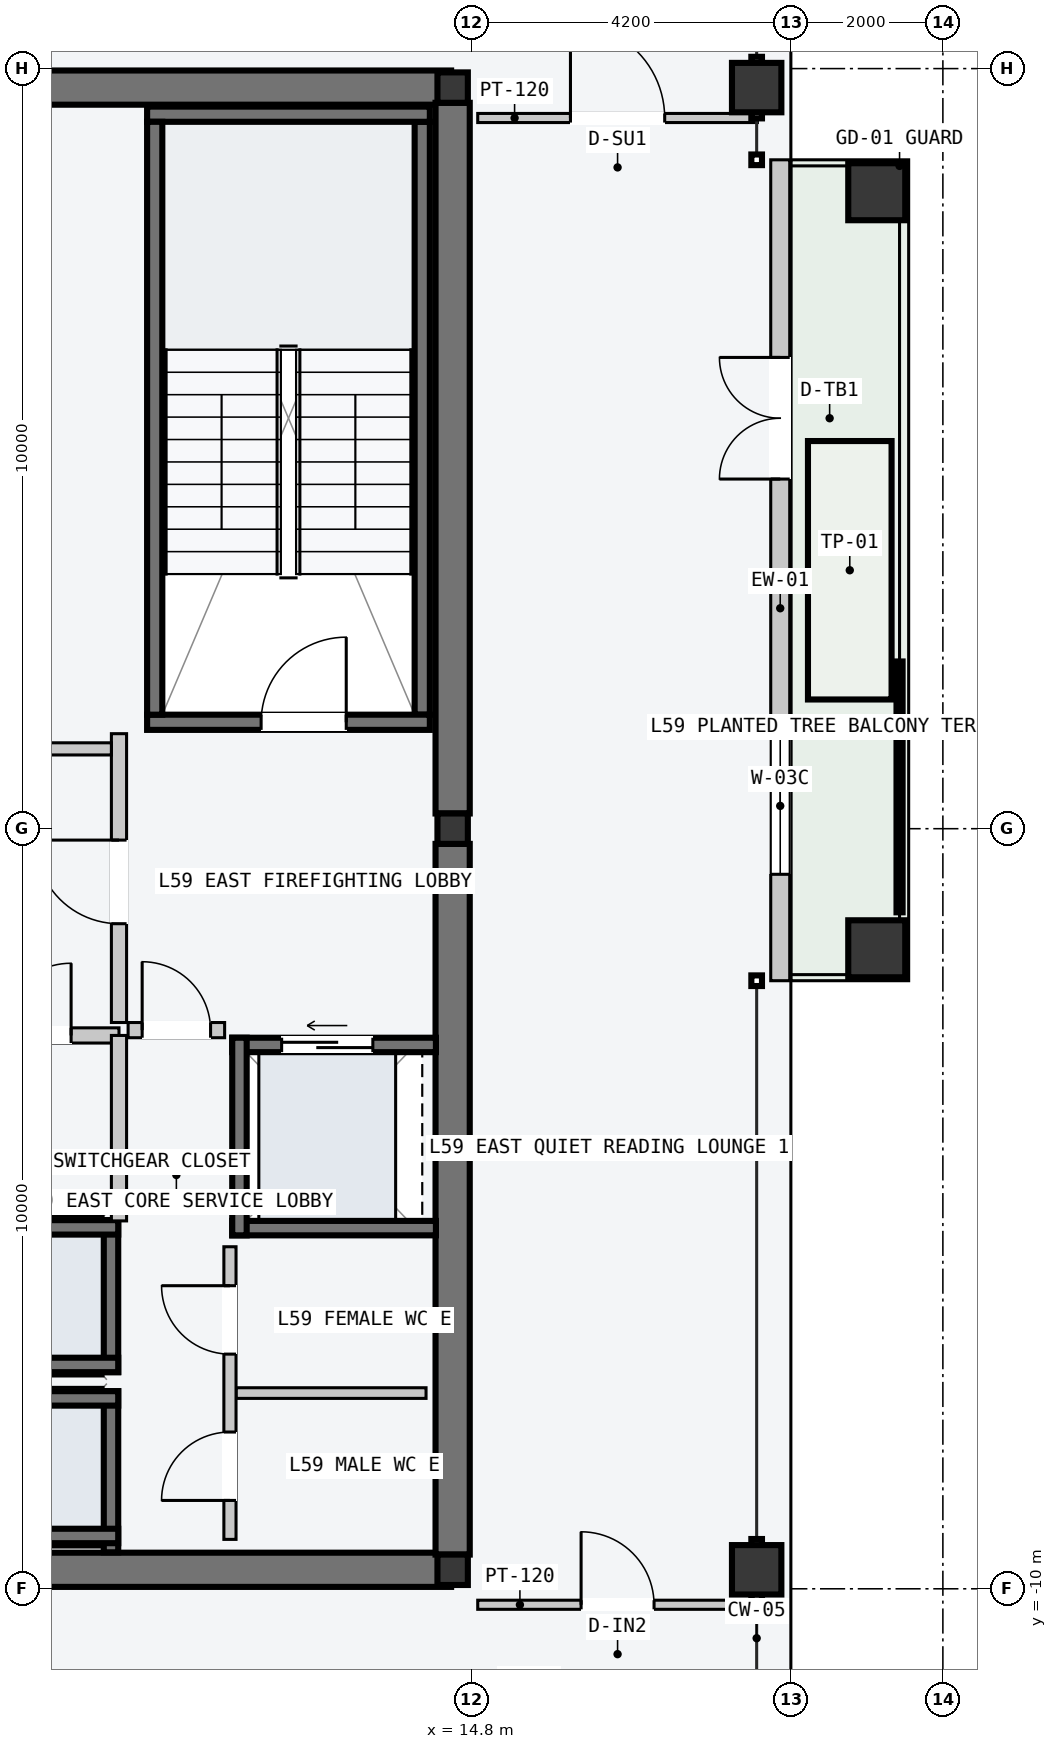
"""IFC4 building model, lengths in metres.
Left out: names, types, materials, properties, quantities, classifications, styles, units other than length and angle.
Written with IfcOpenShell. Run it as: python <this file> out.ifc"""

import sys

from ifc_helpers import new_model, si_unit, direction, frame, frame_2d, origin, origin_2d, place, context, subcontext, project, spatial, rectangle, hollow_rectangle, i_section, extrude, element, fill, save


model = new_model("IFC4")
c1 = context("Model", 3, precision=1e-05, world=origin(), true_north=direction((0.0, 1.0)))
c2 = subcontext(c1, "Body", "Model", "MODEL_VIEW")
j1 = project(units=[si_unit("LENGTHUNIT", "METRE"), si_unit("PLANEANGLEUNIT", "RADIAN")], contexts=[c1])
p1 = place(None, origin())
s1 = spatial("IfcSite", under=j1, at=p1, CompositionType="ELEMENT")
p2 = place(p1, origin())
s2 = spatial("IfcBuilding", under=s1, at=p2, CompositionType="ELEMENT")
p3 = place(p2, frame((0.0, 0.0, 225.6)))
s3 = spatial("IfcBuildingStorey", under=s2, at=p3, CompositionType="ELEMENT", Elevation=225.6)
for number, where, z_axis, x_axis in (
    (1, (8.07, -9.75, -0.2), (0.0, 0.0, 1.0), (1.0, 0.0, 0.0)),
    (2, (8.07, 9.75, -0.2), (0.0, 0.0, 1.0), (1.0, 0.0, 0.0)),
):
    element("IfcWall", number, at=place(p3, frame(where, z_axis=z_axis, x_axis=x_axis)), inside=s3, PredefinedType="SHEAR", context=c2, shape_type="SweptSolid", body=[
        extrude(rectangle(XDim=6.46, YDim=0.45, at=frame_2d((3.23, 0.0))), origin(), (0.0, 0.0, 1.0), 3.6),
    ])
for number, where, z_axis, x_axis in (
    (3, (14.55, -9.55, -0.2), (0.0, 0.0, 1.0), (0.0, 1.0, 0.0)),
    (4, (14.55, 0.2, -0.2), (0.0, 0.0, 1.0), (0.0, 1.0, 0.0)),
):
    element("IfcWall", number, at=place(p3, frame(where, z_axis=z_axis, x_axis=x_axis)), inside=s3, PredefinedType="SHEAR", context=c2, shape_type="SweptSolid", body=[
        extrude(rectangle(XDim=9.35, YDim=0.45, at=frame_2d((4.675, 0.0))), origin(), (0.0, 0.0, 1.0), 3.6),
    ])
p4 = place(p3, frame((14.15, 1.5, -0.2), z_axis=(0.0, 0.0, 1.0), x_axis=(0.0, 1.0, 0.0)))
e5 = element("IfcWall", 5, at=p4, inside=s3, PredefinedType="SOLIDWALL", context=c2, shape_type="SweptSolid", body=[
    extrude(rectangle(XDim=7.8, YDim=0.2, at=frame_2d((3.9, 0.0))), origin(), (0.0, 0.0, 1.0), 3.6),
])
p5 = place(p3, frame((10.53, 1.4, -0.2), z_axis=(0.0, 0.0, 1.0), x_axis=(1.0, 0.0, 0.0)))
e6 = element("IfcWall", 6, at=p5, inside=s3, PredefinedType="SOLIDWALL", context=c2, shape_type="SweptSolid", body=[
    extrude(rectangle(XDim=3.72, YDim=0.2, at=frame_2d((1.86, 0.0))), origin(), (0.0, 0.0, 1.0), 3.6),
])
p6 = place(p5, frame((1.5, 0.0, 0.2)))
e7 = element("IfcOpeningElement", 7, at=p6, cuts=e6, PredefinedType="OPENING", context=c2, shape_type="SweptSolid", body=[
    extrude(rectangle(XDim=1.12, YDim=2.18, at=frame_2d((0.56, 1.09))), frame((0.0, 0.11, 0.0), z_axis=(0.0, -1.0, 0.0), x_axis=(1.0, 0.0, 0.0)), (0.0, 0.0, 1.0), 0.22),
])
p7 = place(p3, frame((10.53, 9.4, -0.2), z_axis=(0.0, 0.0, 1.0), x_axis=(1.0, 0.0, 0.0)))
e8 = element("IfcWall", 8, at=p7, inside=s3, PredefinedType="SOLIDWALL", context=c2, shape_type="SweptSolid", body=[
    extrude(rectangle(XDim=3.72, YDim=0.2, at=frame_2d((1.86, 0.0))), origin(), (0.0, 0.0, 1.0), 3.6),
])
p8 = place(p3, frame((10.63, 1.5, -0.2), z_axis=(0.0, 0.0, 1.0), x_axis=(0.0, 1.0, 0.0)))
e9 = element("IfcWall", 9, at=p8, inside=s3, PredefinedType="SOLIDWALL", context=c2, shape_type="SweptSolid", body=[
    extrude(rectangle(XDim=7.8, YDim=0.2, at=frame_2d((3.9, 0.0))), origin(), (0.0, 0.0, 1.0), 3.6),
])
for number, where, z_axis, x_axis in (
    (10, (14.55, -9.75, 0.0), (0.0, 0.0, 1.0), (1.0, 0.0, 0.0)),
    (11, (14.55, 0.0, 0.0), (0.0, 0.0, 1.0), (1.0, 0.0, 0.0)),
    (12, (14.55, 9.75, 0.0), (0.0, 0.0, 1.0), (1.0, 0.0, 0.0)),
):
    element("IfcColumn", number, at=place(p3, frame(where, z_axis=z_axis, x_axis=x_axis)), inside=s3, PredefinedType="COLUMN", context=c2, shape_type="SweptSolid", body=[
        extrude(i_section(OverallWidth=0.4, OverallDepth=0.4, WebThickness=0.013, FlangeThickness=0.021, at=origin_2d()), origin(), (0.0, 0.0, 1.0), 3.6),
    ])
for number, where, z_axis, x_axis in (
    (13, (18.55, -9.75, 0.0), (0.0, 0.0, 1.0), (0.0, 1.0, 0.0)),
    (14, (18.55, 9.75, 0.0), (0.0, 0.0, 1.0), (0.0, 1.0, 0.0)),
):
    element("IfcColumn", number, at=place(p3, frame(where, z_axis=z_axis, x_axis=x_axis)), inside=s3, PredefinedType="COLUMN", context=c2, shape_type="SweptSolid", body=[
        extrude(hollow_rectangle(XDim=0.65, YDim=0.65, WallThickness=0.028, at=origin_2d()), origin(), (0.0, 0.0, 1.0), 3.6),
    ])
for number, where, z_axis, x_axis in (
    (15, (20.13, -1.58, 0.0), (0.0, 0.0, 1.0), (0.0, 1.0, 0.0)),
    (16, (20.13, 8.38, 0.0), (0.0, 0.0, 1.0), (0.0, 1.0, 0.0)),
):
    element("IfcColumn", number, at=place(p3, frame(where, z_axis=z_axis, x_axis=x_axis)), inside=s3, PredefinedType="COLUMN", context=c2, shape_type="SweptSolid", body=[
        extrude(hollow_rectangle(XDim=0.75, YDim=0.75, WallThickness=0.032, at=origin_2d()), origin(), (0.0, 0.0, 1.0), 3.6),
    ])
p9 = place(p3, frame((18.86, -2.0, 0.0), z_axis=(0.0, 0.0, 1.0), x_axis=(0.0, 1.0, 0.0)))
e17 = element("IfcWall", 17, at=p9, inside=s3, PredefinedType="STANDARD", context=c2, shape_type="SweptSolid", body=[
    extrude(rectangle(XDim=10.8, YDim=0.25, at=frame_2d((5.4, 0.0))), origin(), (0.0, 0.0, 1.0), 3.4),
])
p10 = place(p9, frame((6.6, 0.0, 0.0)))
e18 = element("IfcOpeningElement", 18, at=p10, cuts=e17, PredefinedType="OPENING", context=c2, shape_type="SweptSolid", body=[
    extrude(rectangle(XDim=1.6, YDim=2.2, at=frame_2d((0.8, 1.1))), frame((0.0, 0.135, 0.0), z_axis=(0.0, -1.0, 0.0), x_axis=(1.0, 0.0, 0.0)), (0.0, 0.0, 1.0), 0.27),
])
p11 = place(p9, frame((1.4, 0.0, 0.85)))
e19 = element("IfcOpeningElement", 19, at=p11, cuts=e17, PredefinedType="OPENING", context=c2, shape_type="SweptSolid", body=[
    extrude(rectangle(XDim=1.8, YDim=2.05, at=frame_2d((0.9, 1.025))), frame((0.0, 0.135, 0.0), z_axis=(0.0, -1.0, 0.0), x_axis=(1.0, 0.0, 0.0)), (0.0, 0.0, 1.0), 0.27),
])
p12 = place(p3, frame((10.055, -9.52, -0.2), z_axis=(0.0, 0.0, 1.0), x_axis=(0.0, 1.0, 0.0)))
e20 = element("IfcWall", 20, at=p12, inside=s3, PredefinedType="SOLIDWALL", context=c2, shape_type="SweptSolid", body=[
    extrude(rectangle(XDim=2.12, YDim=0.19, at=frame_2d((1.06, 0.0))), origin(), (0.0, 0.0, 1.0), 3.6),
])
for number, where, z_axis, x_axis in (
    (21, (7.95, -7.495, -0.2), (0.0, 0.0, 1.0), (1.0, 0.0, 0.0)),
    (22, (7.95, -9.305, -0.2), (0.0, 0.0, 1.0), (1.0, 0.0, 0.0)),
):
    element("IfcWall", number, at=place(p3, frame(where, z_axis=z_axis, x_axis=x_axis)), inside=s3, PredefinedType="SOLIDWALL", context=c2, shape_type="SweptSolid", body=[
        extrude(rectangle(XDim=2.2, YDim=0.19, at=frame_2d((1.1, 0.0))), origin(), (0.0, 0.0, 1.0), 3.6),
    ])
p13 = place(p3, frame((10.055, -7.15, -0.2), z_axis=(0.0, 0.0, 1.0), x_axis=(0.0, 1.0, 0.0)))
e23 = element("IfcWall", 23, at=p13, inside=s3, PredefinedType="SOLIDWALL", context=c2, shape_type="SweptSolid", body=[
    extrude(rectangle(XDim=2.0, YDim=0.19, at=frame_2d((1.0, 0.0))), origin(), (0.0, 0.0, 1.0), 3.6),
])
for number, where, z_axis, x_axis in (
    (24, (7.95, -5.245, -0.2), (0.0, 0.0, 1.0), (1.0, 0.0, 0.0)),
    (25, (7.95, -7.055, -0.2), (0.0, 0.0, 1.0), (1.0, 0.0, 0.0)),
):
    element("IfcWall", number, at=place(p3, frame(where, z_axis=z_axis, x_axis=x_axis)), inside=s3, PredefinedType="SOLIDWALL", context=c2, shape_type="SweptSolid", body=[
        extrude(rectangle(XDim=2.2, YDim=0.19, at=frame_2d((1.1, 0.0))), origin(), (0.0, 0.0, 1.0), 3.6),
    ])
p14 = place(p3, frame((11.65, -2.845, -0.2), z_axis=(0.0, 0.0, 1.0), x_axis=(1.0, 0.0, 0.0)))
e26 = element("IfcWall", 26, at=p14, inside=s3, PredefinedType="SOLIDWALL", context=c2, shape_type="SweptSolid", body=[
    extrude(rectangle(XDim=2.68, YDim=0.19, at=frame_2d((1.34, 0.0))), origin(), (0.0, 0.0, 1.0), 3.6),
])
p15 = place(p14, frame((0.65, 0.0, 0.2)))
e27 = element("IfcOpeningElement", 27, at=p15, cuts=e26, PredefinedType="OPENING", context=c2, shape_type="SweptSolid", body=[
    extrude(rectangle(XDim=1.2, YDim=2.2, at=frame_2d((0.6, 1.1))), frame((0.0, 0.105, 0.0), z_axis=(0.0, -1.0, 0.0), x_axis=(1.0, 0.0, 0.0)), (0.0, 0.0, 1.0), 0.21),
])
p16 = place(p3, frame((11.65, -5.255, -0.2), z_axis=(0.0, 0.0, 1.0), x_axis=(1.0, 0.0, 0.0)))
e28 = element("IfcWall", 28, at=p16, inside=s3, PredefinedType="SOLIDWALL", context=c2, shape_type="SweptSolid", body=[
    extrude(rectangle(XDim=2.68, YDim=0.19, at=frame_2d((1.34, 0.0))), origin(), (0.0, 0.0, 1.0), 3.6),
])
p17 = place(p3, frame((11.745, -5.35, -0.2), z_axis=(0.0, 0.0, 1.0), x_axis=(0.0, 1.0, 0.0)))
e29 = element("IfcWall", 29, at=p17, inside=s3, PredefinedType="SOLIDWALL", context=c2, shape_type="SweptSolid", body=[
    extrude(rectangle(XDim=2.6, YDim=0.19, at=frame_2d((1.3, 0.0))), origin(), (0.0, 0.0, 1.0), 3.6),
])
p18 = place(p3, frame((10.16, -2.55, 0.0), z_axis=(0.0, 0.0, 1.0), x_axis=(0.0, 1.0, 0.0)))
e30 = element("IfcWall", 30, at=p18, inside=s3, PredefinedType="PARTITIONING", context=c2, shape_type="SweptSolid", body=[
    extrude(rectangle(XDim=3.8, YDim=0.2, at=frame_2d((1.9, 0.0))), origin(), (0.0, 0.0, 1.0), 3.4),
])
p19 = place(p18, frame((1.3, 0.0, 0.0)))
e31 = element("IfcOpeningElement", 31, at=p19, cuts=e30, PredefinedType="OPENING", context=c2, shape_type="SweptSolid", body=[
    extrude(rectangle(XDim=1.1, YDim=2.15, at=frame_2d((0.55, 1.075))), frame((0.0, 0.11, 0.0), z_axis=(0.0, -1.0, 0.0), x_axis=(1.0, 0.0, 0.0)), (0.0, 0.0, 1.0), 0.22),
])
p20 = place(p3, frame((10.28, -2.65, 0.0), z_axis=(0.0, 0.0, 1.0), x_axis=(1.0, 0.0, 0.0)))
e32 = element("IfcWall", 32, at=p20, inside=s3, PredefinedType="PARTITIONING", context=c2, shape_type="SweptSolid", body=[
    extrude(rectangle(XDim=1.27, YDim=0.2, at=frame_2d((0.635, 0.0))), origin(), (0.0, 0.0, 1.0), 3.4),
])
p21 = place(p20, frame((0.185, 0.0, 0.0)))
e33 = element("IfcOpeningElement", 33, at=p21, cuts=e32, PredefinedType="OPENING", context=c2, shape_type="SweptSolid", body=[
    extrude(rectangle(XDim=0.9, YDim=2.15, at=frame_2d((0.45, 1.075))), frame((0.0, 0.11, 0.0), z_axis=(0.0, -1.0, 0.0), x_axis=(1.0, 0.0, 0.0)), (0.0, 0.0, 1.0), 0.22),
])
p22 = place(p3, frame((7.96, -2.72, 0.0), z_axis=(0.0, 0.0, 1.0), x_axis=(1.0, 0.0, 0.0)))
e34 = element("IfcWall", 34, at=p22, inside=s3, PredefinedType="PARTITIONING", context=c2, shape_type="SweptSolid", body=[
    extrude(rectangle(XDim=2.2, YDim=0.2, at=frame_2d((1.1, 0.0))), origin(), (0.0, 0.0, 1.0), 3.4),
])
p23 = place(p22, frame((0.62, 0.0, 0.0)))
e35 = element("IfcOpeningElement", 35, at=p23, cuts=e34, PredefinedType="OPENING", context=c2, shape_type="SweptSolid", body=[
    extrude(rectangle(XDim=0.95, YDim=2.1, at=frame_2d((0.475, 1.05))), frame((0.0, 0.11, 0.0), z_axis=(0.0, -1.0, 0.0), x_axis=(1.0, 0.0, 0.0)), (0.0, 0.0, 1.0), 0.22),
])
p24 = place(p3, frame((10.16, -5.16, 0.0), z_axis=(0.0, 0.0, 1.0), x_axis=(0.0, 1.0, 0.0)))
e36 = element("IfcWall", 36, at=p24, inside=s3, PredefinedType="PARTITIONING", context=c2, shape_type="SweptSolid", body=[
    extrude(rectangle(XDim=2.44, YDim=0.2, at=frame_2d((1.22, 0.0))), origin(), (0.0, 0.0, 1.0), 3.4),
])
p25 = place(p3, frame((11.7, -7.425, 0.0), z_axis=(0.0, 0.0, 1.0), x_axis=(1.0, 0.0, 0.0)))
e37 = element("IfcWall", 37, at=p25, inside=s3, PredefinedType="PARTITIONING", context=c2, shape_type="SweptSolid", body=[
    extrude(rectangle(XDim=2.5, YDim=0.14, at=frame_2d((1.25, 0.0))), origin(), (0.0, 0.0, 1.0), 3.4),
])
p26 = place(p3, frame((11.62, -9.35, 0.0), z_axis=(0.0, 0.0, 1.0), x_axis=(0.0, 1.0, 0.0)))
e38 = element("IfcWall", 38, at=p26, inside=s3, PredefinedType="PARTITIONING", context=c2, shape_type="SweptSolid", body=[
    extrude(rectangle(XDim=3.85, YDim=0.16, at=frame_2d((1.925, 0.0))), origin(), (0.0, 0.0, 1.0), 3.4),
])
p27 = place(p26, frame((0.512, 0.0, 0.0)))
e39 = element("IfcOpeningElement", 39, at=p27, cuts=e38, PredefinedType="OPENING", context=c2, shape_type="SweptSolid", body=[
    extrude(rectangle(XDim=0.9, YDim=2.15, at=frame_2d((0.45, 1.075))), frame((0.0, 0.09, 0.0), z_axis=(0.0, -1.0, 0.0), x_axis=(1.0, 0.0, 0.0)), (0.0, 0.0, 1.0), 0.18),
])
p28 = place(p26, frame((2.438, 0.0, 0.0)))
e40 = element("IfcOpeningElement", 40, at=p28, cuts=e38, PredefinedType="OPENING", context=c2, shape_type="SweptSolid", body=[
    extrude(rectangle(XDim=0.9, YDim=2.15, at=frame_2d((0.45, 1.075))), frame((0.0, 0.09, 0.0), z_axis=(0.0, -1.0, 0.0), x_axis=(1.0, 0.0, 0.0)), (0.0, 0.0, 1.0), 0.18),
])
p29 = place(p3, frame((1.26, 1.05, 0.0), z_axis=(0.0, 0.0, 1.0), x_axis=(1.0, 0.0, 0.0)))
e41 = element("IfcWall", 41, at=p29, inside=s3, PredefinedType="PARTITIONING", context=c2, shape_type="SweptSolid", body=[
    extrude(rectangle(XDim=8.8, YDim=0.16, at=frame_2d((4.4, 0.0))), origin(), (0.0, 0.0, 1.0), 3.4),
])
p30 = place(p3, frame((14.88, 9.35, 0.0), z_axis=(0.0, 0.0, 1.0), x_axis=(1.0, 0.0, 0.0)))
e42 = element("IfcWall", 42, at=p30, inside=s3, PredefinedType="PARTITIONING", context=c2, shape_type="SweptSolid", body=[
    extrude(rectangle(XDim=3.68, YDim=0.12, at=frame_2d((1.84, 0.0))), origin(), (0.0, 0.0, 1.0), 3.4),
])
p31 = place(p30, frame((1.22, 0.0, 0.0)))
e43 = element("IfcOpeningElement", 43, at=p31, cuts=e42, PredefinedType="OPENING", context=c2, shape_type="SweptSolid", body=[
    extrude(rectangle(XDim=1.24, YDim=2.24, at=frame_2d((0.62, 1.12))), frame((0.0, 0.07, 0.0), z_axis=(0.0, -1.0, 0.0), x_axis=(1.0, 0.0, 0.0)), (0.0, 0.0, 1.0), 0.14),
])
p32 = place(p3, frame((14.88, -10.21, 0.0), z_axis=(0.0, 0.0, 1.0), x_axis=(1.0, 0.0, 0.0)))
e44 = element("IfcWall", 44, at=p32, inside=s3, PredefinedType="PARTITIONING", context=c2, shape_type="SweptSolid", body=[
    extrude(rectangle(XDim=3.68, YDim=0.12, at=frame_2d((1.84, 0.0))), origin(), (0.0, 0.0, 1.0), 3.4),
])
p33 = place(p32, frame((1.36, 0.0, 0.0)))
e45 = element("IfcOpeningElement", 45, at=p33, cuts=e44, PredefinedType="OPENING", context=c2, shape_type="SweptSolid", body=[
    extrude(rectangle(XDim=0.96, YDim=2.18, at=frame_2d((0.48, 1.09))), frame((0.0, 0.07, 0.0), z_axis=(0.0, -1.0, 0.0), x_axis=(1.0, 0.0, 0.0)), (0.0, 0.0, 1.0), 0.14),
])
p34 = place(p6, origin())
e46 = element("IfcDoor", 46, at=p34, inside=s3, OperationType="SINGLE_SWING_RIGHT", PredefinedType="DOOR", context=c2, shape_type="SweptSolid", body=[
    extrude(rectangle(XDim=1.12, YDim=2.18, at=frame_2d((0.56, 1.09))), frame((0.0, 0.025, 0.0), z_axis=(0.0, -1.0, 0.0), x_axis=(1.0, 0.0, 0.0)), (0.0, 0.0, 1.0), 0.05),
])
fill(e7, e46)
p35 = place(p10, origin())
e47 = element("IfcDoor", 47, at=p35, inside=s3, OperationType="DOUBLE_DOOR_SINGLE_SWING", PredefinedType="DOOR", context=c2, shape_type="SweptSolid", body=[
    extrude(rectangle(XDim=1.6, YDim=2.2, at=frame_2d((0.8, 1.1))), frame((0.0, 0.025, 0.0), z_axis=(0.0, -1.0, 0.0), x_axis=(1.0, 0.0, 0.0)), (0.0, 0.0, 1.0), 0.05),
])
fill(e18, e47)
p36 = place(p11, origin())
e48 = element("IfcWindow", 48, at=p36, inside=s3, PartitioningType="SINGLE_PANEL", PredefinedType="WINDOW", context=c2, shape_type="SweptSolid", body=[
    extrude(rectangle(XDim=1.8, YDim=2.05, at=frame_2d((0.9, 1.025))), frame((0.0, 0.03, 0.0), z_axis=(0.0, -1.0, 0.0), x_axis=(1.0, 0.0, 0.0)), (0.0, 0.0, 1.0), 0.06),
])
fill(e19, e48)
p37 = place(p15, origin())
e49 = element("IfcDoor", 49, at=p37, inside=s3, OperationType="SLIDING_TO_LEFT", PredefinedType="DOOR", context=c2, shape_type="SweptSolid", body=[
    extrude(rectangle(XDim=1.2, YDim=2.2, at=frame_2d((0.6, 1.1))), frame((0.0, 0.025, 0.0), z_axis=(0.0, -1.0, 0.0), x_axis=(1.0, 0.0, 0.0)), (0.0, 0.0, 1.0), 0.05),
])
fill(e27, e49)
p38 = place(p19, origin())
e50 = element("IfcDoor", 50, at=p38, inside=s3, OperationType="SINGLE_SWING_RIGHT", PredefinedType="DOOR", context=c2, shape_type="SweptSolid", body=[
    extrude(rectangle(XDim=1.1, YDim=2.15, at=frame_2d((0.55, 1.075))), frame((0.0, 0.025, 0.0), z_axis=(0.0, -1.0, 0.0), x_axis=(1.0, 0.0, 0.0)), (0.0, 0.0, 1.0), 0.05),
])
fill(e31, e50)
p39 = place(p21, origin())
e51 = element("IfcDoor", 51, at=p39, inside=s3, OperationType="SINGLE_SWING_LEFT", PredefinedType="DOOR", context=c2, shape_type="SweptSolid", body=[
    extrude(rectangle(XDim=0.9, YDim=2.15, at=frame_2d((0.45, 1.075))), frame((0.0, 0.025, 0.0), z_axis=(0.0, -1.0, 0.0), x_axis=(1.0, 0.0, 0.0)), (0.0, 0.0, 1.0), 0.05),
])
fill(e33, e51)
p40 = place(p23, origin())
e52 = element("IfcDoor", 52, at=p40, inside=s3, OperationType="SINGLE_SWING_RIGHT", PredefinedType="DOOR", context=c2, shape_type="SweptSolid", body=[
    extrude(rectangle(XDim=0.95, YDim=2.1, at=frame_2d((0.475, 1.05))), frame((0.0, 0.025, 0.0), z_axis=(0.0, -1.0, 0.0), x_axis=(1.0, 0.0, 0.0)), (0.0, 0.0, 1.0), 0.05),
])
fill(e35, e52)
p41 = place(p27, origin())
e53 = element("IfcDoor", 53, at=p41, inside=s3, OperationType="SINGLE_SWING_LEFT", PredefinedType="DOOR", context=c2, shape_type="SweptSolid", body=[
    extrude(rectangle(XDim=0.9, YDim=2.15, at=frame_2d((0.45, 1.075))), frame((0.0, 0.025, 0.0), z_axis=(0.0, -1.0, 0.0), x_axis=(1.0, 0.0, 0.0)), (0.0, 0.0, 1.0), 0.05),
])
fill(e39, e53)
p42 = place(p28, origin())
e54 = element("IfcDoor", 54, at=p42, inside=s3, OperationType="SINGLE_SWING_RIGHT", PredefinedType="DOOR", context=c2, shape_type="SweptSolid", body=[
    extrude(rectangle(XDim=0.9, YDim=2.15, at=frame_2d((0.45, 1.075))), frame((0.0, 0.025, 0.0), z_axis=(0.0, -1.0, 0.0), x_axis=(1.0, 0.0, 0.0)), (0.0, 0.0, 1.0), 0.05),
])
fill(e40, e54)
p43 = place(p31, origin())
e55 = element("IfcDoor", 55, at=p43, inside=s3, OperationType="SINGLE_SWING_LEFT", PredefinedType="DOOR", context=c2, shape_type="SweptSolid", body=[
    extrude(rectangle(XDim=1.24, YDim=2.24, at=frame_2d((0.62, 1.12))), frame((0.0, 0.025, 0.0), z_axis=(0.0, -1.0, 0.0), x_axis=(1.0, 0.0, 0.0)), (0.0, 0.0, 1.0), 0.05),
])
fill(e43, e55)
p44 = place(p33, origin())
e56 = element("IfcDoor", 56, at=p44, inside=s3, OperationType="SINGLE_SWING_LEFT", PredefinedType="DOOR", context=c2, shape_type="SweptSolid", body=[
    extrude(rectangle(XDim=0.96, YDim=2.18, at=frame_2d((0.48, 1.09))), frame((0.0, 0.025, 0.0), z_axis=(0.0, -1.0, 0.0), x_axis=(1.0, 0.0, 0.0)), (0.0, 0.0, 1.0), 0.05),
])
fill(e45, e56)
save(model, sys.argv[1])
